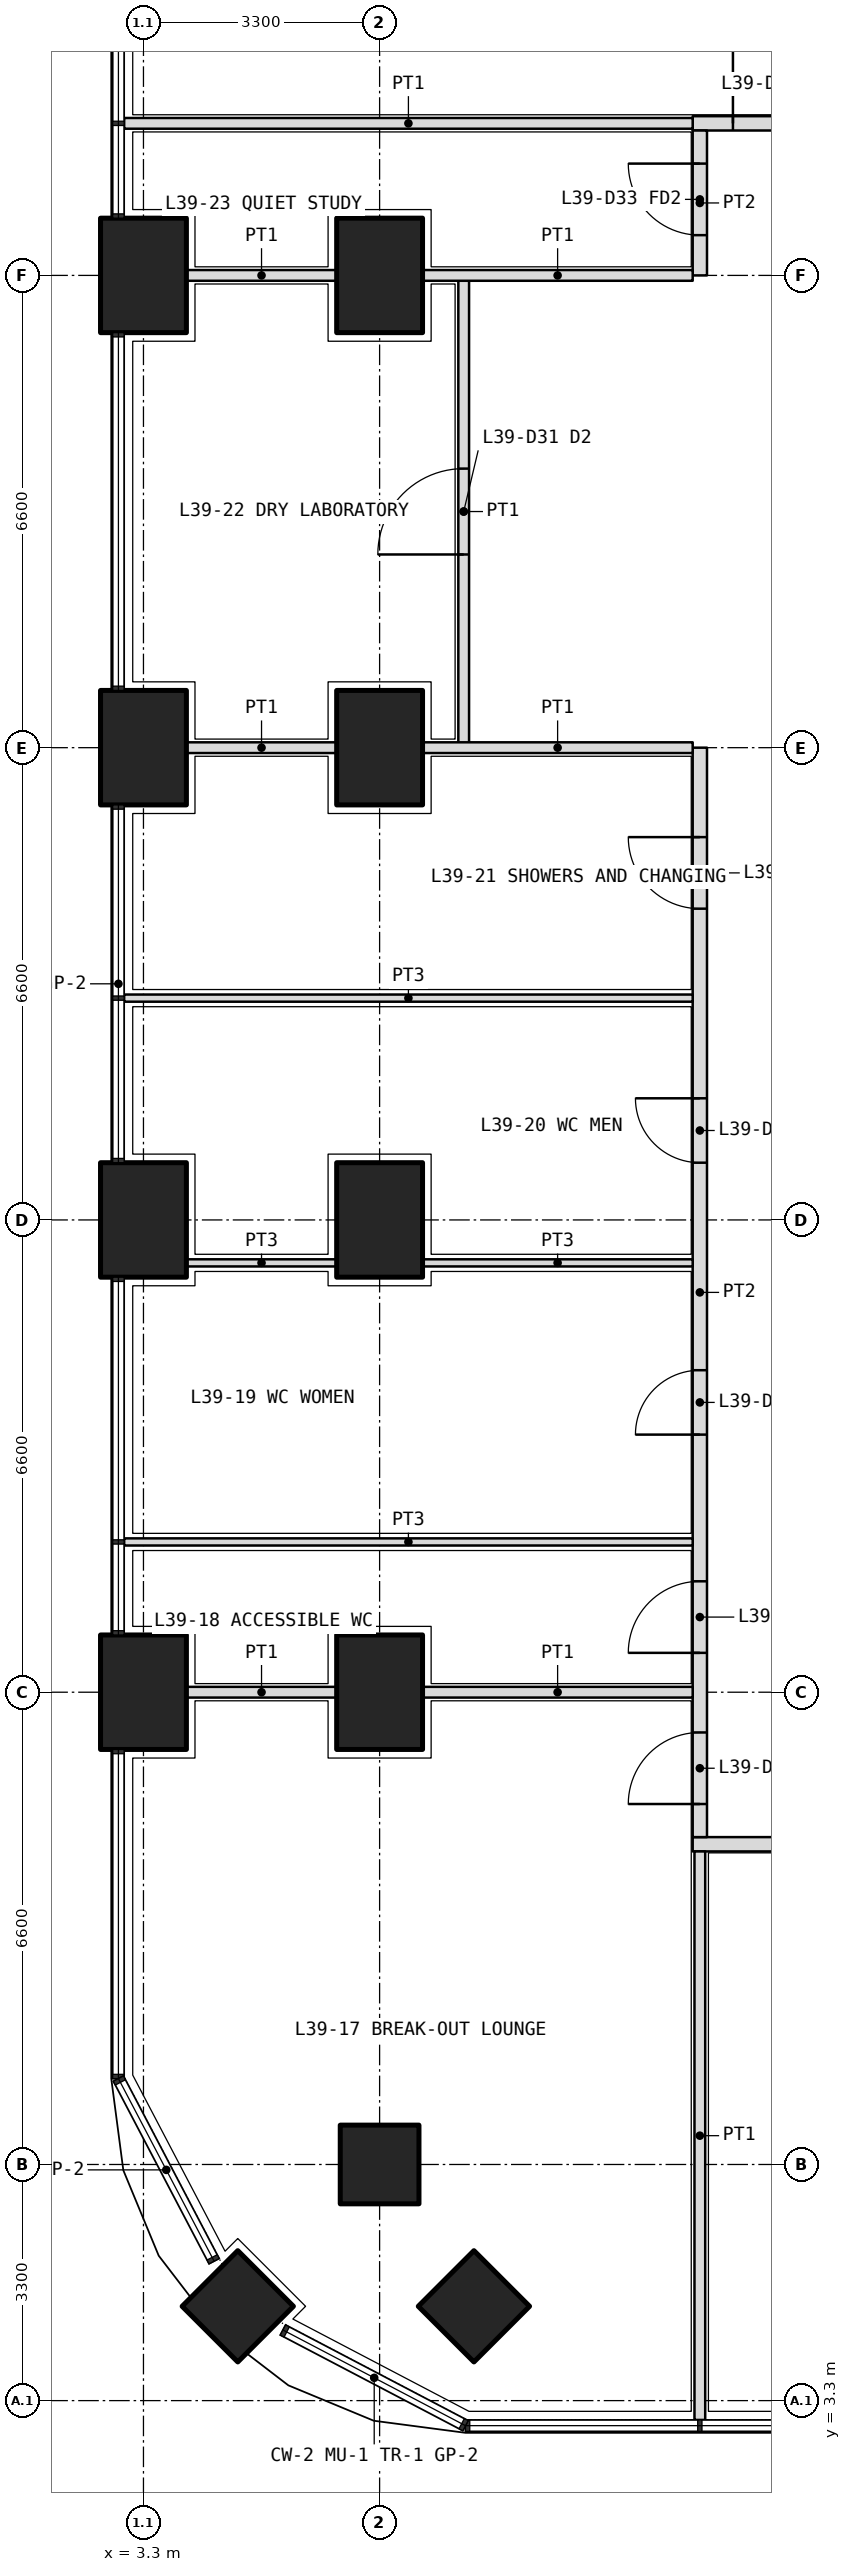
"""IFC4 building model, lengths in metres.
Left out: names, types, materials, properties, quantities, classifications, styles, units other than length and angle.
Written with IfcOpenShell. Run it as: python <this file> out.ifc"""

import sys

from ifc_helpers import new_model, si_unit, direction, frame, frame_2d, origin, origin_2d, place, context, subcontext, project, spatial, rectangle, extrude, element, fill, save


model = new_model("IFC4")
c1 = context("Model", 3, precision=1e-05, world=origin(), true_north=direction((0.0, 1.0)))
c2 = subcontext(c1, "Body", "Model", "MODEL_VIEW")
j1 = project(units=[si_unit("LENGTHUNIT", "METRE"), si_unit("PLANEANGLEUNIT", "RADIAN")], contexts=[c1])
p1 = place(None, origin())
s1 = spatial("IfcSite", under=j1, at=p1, CompositionType="ELEMENT")
p2 = place(p1, origin())
s2 = spatial("IfcBuilding", under=s1, at=p2, CompositionType="ELEMENT")
p3 = place(p2, frame((0.0, 0.0, 172.5)))
s3 = spatial("IfcBuildingStorey", under=s2, at=p3, CompositionType="ELEMENT", Elevation=172.5)
p4 = place(p3, frame((4.618, 4.618, 0.0), z_axis=(0.0, 0.0, 1.0), x_axis=(0.707106781187, 0.707106781187, 0.0)))
e1 = element("IfcColumn", 1, at=p4, inside=s3, PredefinedType="COLUMN", context=c2, shape_type="SweptSolid", body=[
    extrude(rectangle(XDim=1.1, YDim=1.1, at=origin_2d()), origin(), (0.0, 0.0, 1.0), 4.2),
])
for number, where, z_axis, x_axis in (
    (2, (3.3, 13.2, 0.0), (0.0, 0.0, 1.0), (0.0, 1.0, 0.0)),
    (3, (3.3, 19.8, 0.0), (0.0, 0.0, 1.0), (0.0, 1.0, 0.0)),
    (4, (3.3, 26.4, 0.0), (0.0, 0.0, 1.0), (0.0, 1.0, 0.0)),
    (5, (3.3, 33.0, 0.0), (0.0, 0.0, 1.0), (0.0, 1.0, 0.0)),
):
    element("IfcColumn", number, at=place(p3, frame(where, z_axis=z_axis, x_axis=x_axis)), inside=s3, PredefinedType="COLUMN", context=c2, shape_type="SweptSolid", body=[
        extrude(rectangle(XDim=1.6, YDim=1.2, at=origin_2d()), origin(), (0.0, 0.0, 1.0), 4.2),
    ])
for number, where, z_axis, x_axis in (
    (6, (6.6, 6.6, 0.0), (0.0, 0.0, 1.0), (1.0, 0.0, 0.0)),
    (7, (7.918, 4.618, 0.0), (0.0, 0.0, 1.0), (0.707, 0.707, 0.0)),
):
    element("IfcColumn", number, at=place(p3, frame(where, z_axis=z_axis, x_axis=x_axis)), inside=s3, PredefinedType="COLUMN", context=c2, shape_type="SweptSolid", body=[
        extrude(rectangle(XDim=1.1, YDim=1.1, at=origin_2d()), origin(), (0.0, 0.0, 1.0), 4.2),
    ])
for number, where, z_axis, x_axis in (
    (8, (6.6, 13.2, 0.0), (0.0, 0.0, 1.0), (0.0, 1.0, 0.0)),
    (9, (6.6, 19.8, 0.0), (0.0, 0.0, 1.0), (0.0, 1.0, 0.0)),
    (10, (6.6, 26.4, 0.0), (0.0, 0.0, 1.0), (0.0, 1.0, 0.0)),
    (11, (6.6, 33.0, 0.0), (0.0, 0.0, 1.0), (0.0, 1.0, 0.0)),
):
    element("IfcColumn", number, at=place(p3, frame(where, z_axis=z_axis, x_axis=x_axis)), inside=s3, PredefinedType="COLUMN", context=c2, shape_type="SweptSolid", body=[
        extrude(rectangle(XDim=1.6, YDim=1.2, at=origin_2d()), origin(), (0.0, 0.0, 1.0), 4.2),
    ])
p5 = place(p3, frame((10.975, 11.075, 0.0), z_axis=(0.0, 0.0, 1.0), x_axis=(1.0, 0.0, 0.0)))
e12 = element("IfcWall", 12, at=p5, inside=s3, PredefinedType="PARTITIONING", context=c2, shape_type="SweptSolid", body=[
    extrude(rectangle(XDim=30.85, YDim=0.2, at=frame_2d((15.425, 0.0))), origin(), (0.0, 0.0, 1.0), 2.85),
])
p6 = place(p5, frame((7.262, 0.0, 0.0)))
e13 = element("IfcOpeningElement", 13, at=p6, cuts=e12, PredefinedType="OPENING", context=c2, shape_type="SweptSolid", body=[
    extrude(rectangle(XDim=1.0, YDim=2.1, at=frame_2d((0.5, 1.05))), frame((0.0, 0.11, 0.0), z_axis=(0.0, -1.0, 0.0), x_axis=(1.0, 0.0, 0.0)), (0.0, 0.0, 1.0), 0.22),
])
p7 = place(p5, frame((16.475, 0.0, 0.0)))
e14 = element("IfcOpeningElement", 14, at=p7, cuts=e12, PredefinedType="OPENING", context=c2, shape_type="SweptSolid", body=[
    extrude(rectangle(XDim=1.2, YDim=2.1, at=frame_2d((0.6, 1.05))), frame((0.0, 0.11, 0.0), z_axis=(0.0, -1.0, 0.0), x_axis=(1.0, 0.0, 0.0)), (0.0, 0.0, 1.0), 0.22),
])
p8 = place(p5, frame((21.525, 0.0, 0.0)))
e15 = element("IfcOpeningElement", 15, at=p8, cuts=e12, PredefinedType="OPENING", context=c2, shape_type="SweptSolid", body=[
    extrude(rectangle(XDim=1.0, YDim=2.1, at=frame_2d((0.5, 1.05))), frame((0.0, 0.11, 0.0), z_axis=(0.0, -1.0, 0.0), x_axis=(1.0, 0.0, 0.0)), (0.0, 0.0, 1.0), 0.22),
])
p9 = place(p5, frame((26.375, 0.0, 0.0)))
e16 = element("IfcOpeningElement", 16, at=p9, cuts=e12, PredefinedType="OPENING", context=c2, shape_type="SweptSolid", body=[
    extrude(rectangle(XDim=1.2, YDim=2.1, at=frame_2d((0.6, 1.05))), frame((0.0, 0.11, 0.0), z_axis=(0.0, -1.0, 0.0), x_axis=(1.0, 0.0, 0.0)), (0.0, 0.0, 1.0), 0.22),
])
p10 = place(p5, frame((29.188, 0.0, 0.0)))
e17 = element("IfcOpeningElement", 17, at=p10, cuts=e12, PredefinedType="OPENING", context=c2, shape_type="SweptSolid", body=[
    extrude(rectangle(XDim=1.0, YDim=2.1, at=frame_2d((0.5, 1.05))), frame((0.0, 0.11, 0.0), z_axis=(0.0, -1.0, 0.0), x_axis=(1.0, 0.0, 0.0)), (0.0, 0.0, 1.0), 0.22),
])
p11 = place(p3, frame((10.975, 35.125, 0.0), z_axis=(0.0, 0.0, 1.0), x_axis=(1.0, 0.0, 0.0)))
e18 = element("IfcWall", 18, at=p11, inside=s3, PredefinedType="PARTITIONING", context=c2, shape_type="SweptSolid", body=[
    extrude(rectangle(XDim=30.85, YDim=0.2, at=frame_2d((15.425, 0.0))), origin(), (0.0, 0.0, 1.0), 2.85),
])
p12 = place(p11, frame((0.562, 0.0, 0.0)))
e19 = element("IfcOpeningElement", 19, at=p12, cuts=e18, PredefinedType="OPENING", context=c2, shape_type="SweptSolid", body=[
    extrude(rectangle(XDim=1.2, YDim=2.1, at=frame_2d((0.6, 1.05))), frame((0.0, 0.11, 0.0), z_axis=(0.0, -1.0, 0.0), x_axis=(1.0, 0.0, 0.0)), (0.0, 0.0, 1.0), 0.22),
])
p13 = place(p11, frame((8.225, 0.0, 0.0)))
e20 = element("IfcOpeningElement", 20, at=p13, cuts=e18, PredefinedType="OPENING", context=c2, shape_type="SweptSolid", body=[
    extrude(rectangle(XDim=1.2, YDim=2.1, at=frame_2d((0.6, 1.05))), frame((0.0, 0.11, 0.0), z_axis=(0.0, -1.0, 0.0), x_axis=(1.0, 0.0, 0.0)), (0.0, 0.0, 1.0), 0.22),
])
p14 = place(p11, frame((16.625, 0.0, 0.0)))
e21 = element("IfcOpeningElement", 21, at=p14, cuts=e18, PredefinedType="OPENING", context=c2, shape_type="SweptSolid", body=[
    extrude(rectangle(XDim=1.0, YDim=2.1, at=frame_2d((0.5, 1.05))), frame((0.0, 0.11, 0.0), z_axis=(0.0, -1.0, 0.0), x_axis=(1.0, 0.0, 0.0)), (0.0, 0.0, 1.0), 0.22),
])
p15 = place(p11, frame((19.925, 0.0, 0.0)))
e22 = element("IfcOpeningElement", 22, at=p15, cuts=e18, PredefinedType="OPENING", context=c2, shape_type="SweptSolid", body=[
    extrude(rectangle(XDim=1.0, YDim=2.1, at=frame_2d((0.5, 1.05))), frame((0.0, 0.11, 0.0), z_axis=(0.0, -1.0, 0.0), x_axis=(1.0, 0.0, 0.0)), (0.0, 0.0, 1.0), 0.22),
])
p16 = place(p11, frame((23.075, 0.0, 0.0)))
e23 = element("IfcOpeningElement", 23, at=p16, cuts=e18, PredefinedType="OPENING", context=c2, shape_type="SweptSolid", body=[
    extrude(rectangle(XDim=1.2, YDim=2.1, at=frame_2d((0.6, 1.05))), frame((0.0, 0.11, 0.0), z_axis=(0.0, -1.0, 0.0), x_axis=(1.0, 0.0, 0.0)), (0.0, 0.0, 1.0), 0.22),
])
p17 = place(p11, frame((27.438, 0.0, 0.0)))
e24 = element("IfcOpeningElement", 24, at=p17, cuts=e18, PredefinedType="OPENING", context=c2, shape_type="SweptSolid", body=[
    extrude(rectangle(XDim=1.2, YDim=2.1, at=frame_2d((0.6, 1.05))), frame((0.0, 0.11, 0.0), z_axis=(0.0, -1.0, 0.0), x_axis=(1.0, 0.0, 0.0)), (0.0, 0.0, 1.0), 0.22),
])
p18 = place(p3, frame((11.075, 11.175, 0.0), z_axis=(0.0, 0.0, 1.0), x_axis=(0.0, 1.0, 0.0)))
e25 = element("IfcWall", 25, at=p18, inside=s3, PredefinedType="PARTITIONING", context=c2, shape_type="SweptSolid", body=[
    extrude(rectangle(XDim=15.225, YDim=0.2, at=frame_2d((7.612, 0.0))), origin(), (0.0, 0.0, 1.0), 2.85),
])
p19 = place(p18, frame((0.462, 0.0, 0.0)))
e26 = element("IfcOpeningElement", 26, at=p19, cuts=e25, PredefinedType="OPENING", context=c2, shape_type="SweptSolid", body=[
    extrude(rectangle(XDim=1.0, YDim=2.1, at=frame_2d((0.5, 1.05))), frame((0.0, 0.11, 0.0), z_axis=(0.0, -1.0, 0.0), x_axis=(1.0, 0.0, 0.0)), (0.0, 0.0, 1.0), 0.22),
])
p20 = place(p18, frame((2.575, 0.0, 0.0)))
e27 = element("IfcOpeningElement", 27, at=p20, cuts=e25, PredefinedType="OPENING", context=c2, shape_type="SweptSolid", body=[
    extrude(rectangle(XDim=1.0, YDim=2.1, at=frame_2d((0.5, 1.05))), frame((0.0, 0.11, 0.0), z_axis=(0.0, -1.0, 0.0), x_axis=(1.0, 0.0, 0.0)), (0.0, 0.0, 1.0), 0.22),
])
p21 = place(p18, frame((5.625, 0.0, 0.0)))
e28 = element("IfcOpeningElement", 28, at=p21, cuts=e25, PredefinedType="OPENING", context=c2, shape_type="SweptSolid", body=[
    extrude(rectangle(XDim=0.9, YDim=2.1, at=frame_2d((0.45, 1.05))), frame((0.0, 0.11, 0.0), z_axis=(0.0, -1.0, 0.0), x_axis=(1.0, 0.0, 0.0)), (0.0, 0.0, 1.0), 0.22),
])
p22 = place(p18, frame((9.425, 0.0, 0.0)))
e29 = element("IfcOpeningElement", 29, at=p22, cuts=e25, PredefinedType="OPENING", context=c2, shape_type="SweptSolid", body=[
    extrude(rectangle(XDim=0.9, YDim=2.1, at=frame_2d((0.45, 1.05))), frame((0.0, 0.11, 0.0), z_axis=(0.0, -1.0, 0.0), x_axis=(1.0, 0.0, 0.0)), (0.0, 0.0, 1.0), 0.22),
])
p23 = place(p18, frame((12.975, 0.0, 0.0)))
e30 = element("IfcOpeningElement", 30, at=p23, cuts=e25, PredefinedType="OPENING", context=c2, shape_type="SweptSolid", body=[
    extrude(rectangle(XDim=1.0, YDim=2.1, at=frame_2d((0.5, 1.05))), frame((0.0, 0.11, 0.0), z_axis=(0.0, -1.0, 0.0), x_axis=(1.0, 0.0, 0.0)), (0.0, 0.0, 1.0), 0.22),
])
p24 = place(p3, frame((11.075, 33.0, 0.0), z_axis=(0.0, 0.0, 1.0), x_axis=(0.0, 1.0, 0.0)))
e31 = element("IfcWall", 31, at=p24, inside=s3, PredefinedType="PARTITIONING", context=c2, shape_type="SweptSolid", body=[
    extrude(rectangle(XDim=2.025, YDim=0.2, at=frame_2d((1.012, 0.0))), origin(), (0.0, 0.0, 1.0), 2.85),
])
p25 = place(p24, frame((0.562, 0.0, 0.0)))
e32 = element("IfcOpeningElement", 32, at=p25, cuts=e31, PredefinedType="OPENING", context=c2, shape_type="SweptSolid", body=[
    extrude(rectangle(XDim=1.0, YDim=2.1, at=frame_2d((0.5, 1.05))), frame((0.0, 0.11, 0.0), z_axis=(0.0, -1.0, 0.0), x_axis=(1.0, 0.0, 0.0)), (0.0, 0.0, 1.0), 0.22),
])
for number, where, z_axis, x_axis in (
    (33, (11.075, 3.03, 0.0), (0.0, 0.0, 1.0), (0.0, 1.0, 0.0)),
    (34, (3.03, 35.125, 0.0), (0.0, 0.0, 1.0), (1.0, 0.0, 0.0)),
):
    element("IfcWall", number, at=place(p3, frame(where, z_axis=z_axis, x_axis=x_axis)), inside=s3, PredefinedType="PARTITIONING", context=c2, shape_type="SweptSolid", body=[
        extrude(rectangle(XDim=7.945, YDim=0.15, at=frame_2d((3.973, 0.0))), origin(), (0.0, 0.0, 1.0), 2.7),
    ])
p26 = place(p3, frame((3.03, 15.3, 0.0), z_axis=(0.0, 0.0, 1.0), x_axis=(1.0, 0.0, 0.0)))
e35 = element("IfcWall", 35, at=p26, inside=s3, PredefinedType="PARTITIONING", context=c2, shape_type="SweptSolid", body=[
    extrude(rectangle(XDim=7.945, YDim=0.1, at=frame_2d((3.973, 0.0))), origin(), (0.0, 0.0, 1.0), 2.7),
])
p27 = place(p3, frame((3.9, 19.2, 0.0), z_axis=(0.0, 0.0, 1.0), x_axis=(1.0, 0.0, 0.0)))
e36 = element("IfcWall", 36, at=p27, inside=s3, PredefinedType="PARTITIONING", context=c2, shape_type="SweptSolid", body=[
    extrude(rectangle(XDim=2.1, YDim=0.1, at=frame_2d((1.05, 0.0))), origin(), (0.0, 0.0, 1.0), 2.85),
])
p28 = place(p3, frame((7.2, 19.2, 0.0), z_axis=(0.0, 0.0, 1.0), x_axis=(1.0, 0.0, 0.0)))
e37 = element("IfcWall", 37, at=p28, inside=s3, PredefinedType="PARTITIONING", context=c2, shape_type="SweptSolid", body=[
    extrude(rectangle(XDim=3.775, YDim=0.1, at=frame_2d((1.888, 0.0))), origin(), (0.0, 0.0, 1.0), 2.85),
])
p29 = place(p3, frame((3.03, 22.9, 0.0), z_axis=(0.0, 0.0, 1.0), x_axis=(1.0, 0.0, 0.0)))
e38 = element("IfcWall", 38, at=p29, inside=s3, PredefinedType="PARTITIONING", context=c2, shape_type="SweptSolid", body=[
    extrude(rectangle(XDim=7.945, YDim=0.1, at=frame_2d((3.973, 0.0))), origin(), (0.0, 0.0, 1.0), 2.7),
])
p30 = place(p3, frame((7.775, 26.4, 0.0), z_axis=(0.0, 0.0, 1.0), x_axis=(0.0, 1.0, 0.0)))
e39 = element("IfcWall", 39, at=p30, inside=s3, PredefinedType="PARTITIONING", context=c2, shape_type="SweptSolid", body=[
    extrude(rectangle(XDim=6.6, YDim=0.15, at=frame_2d((3.3, 0.0))), origin(), (0.0, 0.0, 1.0), 2.85),
])
p31 = place(p30, frame((2.7, 0.0, 0.0)))
e40 = element("IfcOpeningElement", 40, at=p31, cuts=e39, PredefinedType="OPENING", context=c2, shape_type="SweptSolid", body=[
    extrude(rectangle(XDim=1.2, YDim=2.1, at=frame_2d((0.6, 1.05))), frame((0.0, 0.085, 0.0), z_axis=(0.0, -1.0, 0.0), x_axis=(1.0, 0.0, 0.0)), (0.0, 0.0, 1.0), 0.17),
])
p32 = place(p3, frame((3.9, 13.2, 0.0), z_axis=(0.0, 0.0, 1.0), x_axis=(1.0, 0.0, 0.0)))
e41 = element("IfcWall", 41, at=p32, inside=s3, PredefinedType="PARTITIONING", context=c2, shape_type="SweptSolid", body=[
    extrude(rectangle(XDim=2.1, YDim=0.15, at=frame_2d((1.05, 0.0))), origin(), (0.0, 0.0, 1.0), 2.85),
])
p33 = place(p3, frame((7.2, 13.2, 0.0), z_axis=(0.0, 0.0, 1.0), x_axis=(1.0, 0.0, 0.0)))
e42 = element("IfcWall", 42, at=p33, inside=s3, PredefinedType="PARTITIONING", context=c2, shape_type="SweptSolid", body=[
    extrude(rectangle(XDim=3.775, YDim=0.15, at=frame_2d((1.888, 0.0))), origin(), (0.0, 0.0, 1.0), 2.85),
])
p34 = place(p3, frame((3.9, 26.4, 0.0), z_axis=(0.0, 0.0, 1.0), x_axis=(1.0, 0.0, 0.0)))
e43 = element("IfcWall", 43, at=p34, inside=s3, PredefinedType="PARTITIONING", context=c2, shape_type="SweptSolid", body=[
    extrude(rectangle(XDim=2.1, YDim=0.15, at=frame_2d((1.05, 0.0))), origin(), (0.0, 0.0, 1.0), 2.85),
])
p35 = place(p3, frame((7.2, 26.4, 0.0), z_axis=(0.0, 0.0, 1.0), x_axis=(1.0, 0.0, 0.0)))
e44 = element("IfcWall", 44, at=p35, inside=s3, PredefinedType="PARTITIONING", context=c2, shape_type="SweptSolid", body=[
    extrude(rectangle(XDim=3.775, YDim=0.15, at=frame_2d((1.888, 0.0))), origin(), (0.0, 0.0, 1.0), 2.85),
])
p36 = place(p3, frame((3.9, 33.0, 0.0), z_axis=(0.0, 0.0, 1.0), x_axis=(1.0, 0.0, 0.0)))
e45 = element("IfcWall", 45, at=p36, inside=s3, PredefinedType="PARTITIONING", context=c2, shape_type="SweptSolid", body=[
    extrude(rectangle(XDim=2.1, YDim=0.15, at=frame_2d((1.05, 0.0))), origin(), (0.0, 0.0, 1.0), 2.85),
])
p37 = place(p3, frame((7.2, 33.0, 0.0), z_axis=(0.0, 0.0, 1.0), x_axis=(1.0, 0.0, 0.0)))
e46 = element("IfcWall", 46, at=p37, inside=s3, PredefinedType="PARTITIONING", context=c2, shape_type="SweptSolid", body=[
    extrude(rectangle(XDim=3.775, YDim=0.15, at=frame_2d((1.888, 0.0))), origin(), (0.0, 0.0, 1.0), 2.85),
])
p38 = place(p12, origin())
e47 = element("IfcDoor", 47, at=p38, inside=s3, OperationType="DOUBLE_DOOR_SINGLE_SWING", PredefinedType="DOOR", context=c2, shape_type="SweptSolid", body=[
    extrude(rectangle(XDim=1.2, YDim=2.1, at=frame_2d((0.6, 1.05))), frame((0.0, 0.025, 0.0), z_axis=(0.0, -1.0, 0.0), x_axis=(1.0, 0.0, 0.0)), (0.0, 0.0, 1.0), 0.05),
])
fill(e19, e47)
p39 = place(p19, origin())
e48 = element("IfcDoor", 48, at=p39, inside=s3, OperationType="SINGLE_SWING_LEFT", PredefinedType="DOOR", context=c2, shape_type="SweptSolid", body=[
    extrude(rectangle(XDim=1.0, YDim=2.1, at=frame_2d((0.5, 1.05))), frame((0.0, 0.025, 0.0), z_axis=(0.0, -1.0, 0.0), x_axis=(1.0, 0.0, 0.0)), (0.0, 0.0, 1.0), 0.05),
])
fill(e26, e48)
p40 = place(p20, origin())
e49 = element("IfcDoor", 49, at=p40, inside=s3, OperationType="SINGLE_SWING_LEFT", PredefinedType="DOOR", context=c2, shape_type="SweptSolid", body=[
    extrude(rectangle(XDim=1.0, YDim=2.1, at=frame_2d((0.5, 1.05))), frame((0.0, 0.025, 0.0), z_axis=(0.0, -1.0, 0.0), x_axis=(1.0, 0.0, 0.0)), (0.0, 0.0, 1.0), 0.05),
])
fill(e27, e49)
p41 = place(p21, origin())
e50 = element("IfcDoor", 50, at=p41, inside=s3, OperationType="SINGLE_SWING_LEFT", PredefinedType="DOOR", context=c2, shape_type="SweptSolid", body=[
    extrude(rectangle(XDim=0.9, YDim=2.1, at=frame_2d((0.45, 1.05))), frame((0.0, 0.025, 0.0), z_axis=(0.0, -1.0, 0.0), x_axis=(1.0, 0.0, 0.0)), (0.0, 0.0, 1.0), 0.05),
])
fill(e28, e50)
p42 = place(p22, origin())
e51 = element("IfcDoor", 51, at=p42, inside=s3, OperationType="SINGLE_SWING_RIGHT", PredefinedType="DOOR", context=c2, shape_type="SweptSolid", body=[
    extrude(rectangle(XDim=0.9, YDim=2.1, at=frame_2d((0.45, 1.05))), frame((0.0, 0.025, 0.0), z_axis=(0.0, -1.0, 0.0), x_axis=(1.0, 0.0, 0.0)), (0.0, 0.0, 1.0), 0.05),
])
fill(e29, e51)
p43 = place(p23, origin())
e52 = element("IfcDoor", 52, at=p43, inside=s3, OperationType="SINGLE_SWING_RIGHT", PredefinedType="DOOR", context=c2, shape_type="SweptSolid", body=[
    extrude(rectangle(XDim=1.0, YDim=2.1, at=frame_2d((0.5, 1.05))), frame((0.0, 0.025, 0.0), z_axis=(0.0, -1.0, 0.0), x_axis=(1.0, 0.0, 0.0)), (0.0, 0.0, 1.0), 0.05),
])
fill(e30, e52)
p44 = place(p31, origin())
e53 = element("IfcDoor", 53, at=p44, inside=s3, OperationType="DOUBLE_DOOR_SINGLE_SWING", PredefinedType="DOOR", context=c2, shape_type="SweptSolid", body=[
    extrude(rectangle(XDim=1.2, YDim=2.1, at=frame_2d((0.6, 1.05))), frame((0.0, 0.025, 0.0), z_axis=(0.0, -1.0, 0.0), x_axis=(1.0, 0.0, 0.0)), (0.0, 0.0, 1.0), 0.05),
])
fill(e40, e53)
p45 = place(p25, origin())
e54 = element("IfcDoor", 54, at=p45, inside=s3, OperationType="SINGLE_SWING_RIGHT", PredefinedType="DOOR", context=c2, shape_type="SweptSolid", body=[
    extrude(rectangle(XDim=1.0, YDim=2.1, at=frame_2d((0.5, 1.05))), frame((0.0, 0.025, 0.0), z_axis=(0.0, -1.0, 0.0), x_axis=(1.0, 0.0, 0.0)), (0.0, 0.0, 1.0), 0.05),
])
fill(e32, e54)
save(model, sys.argv[1])
